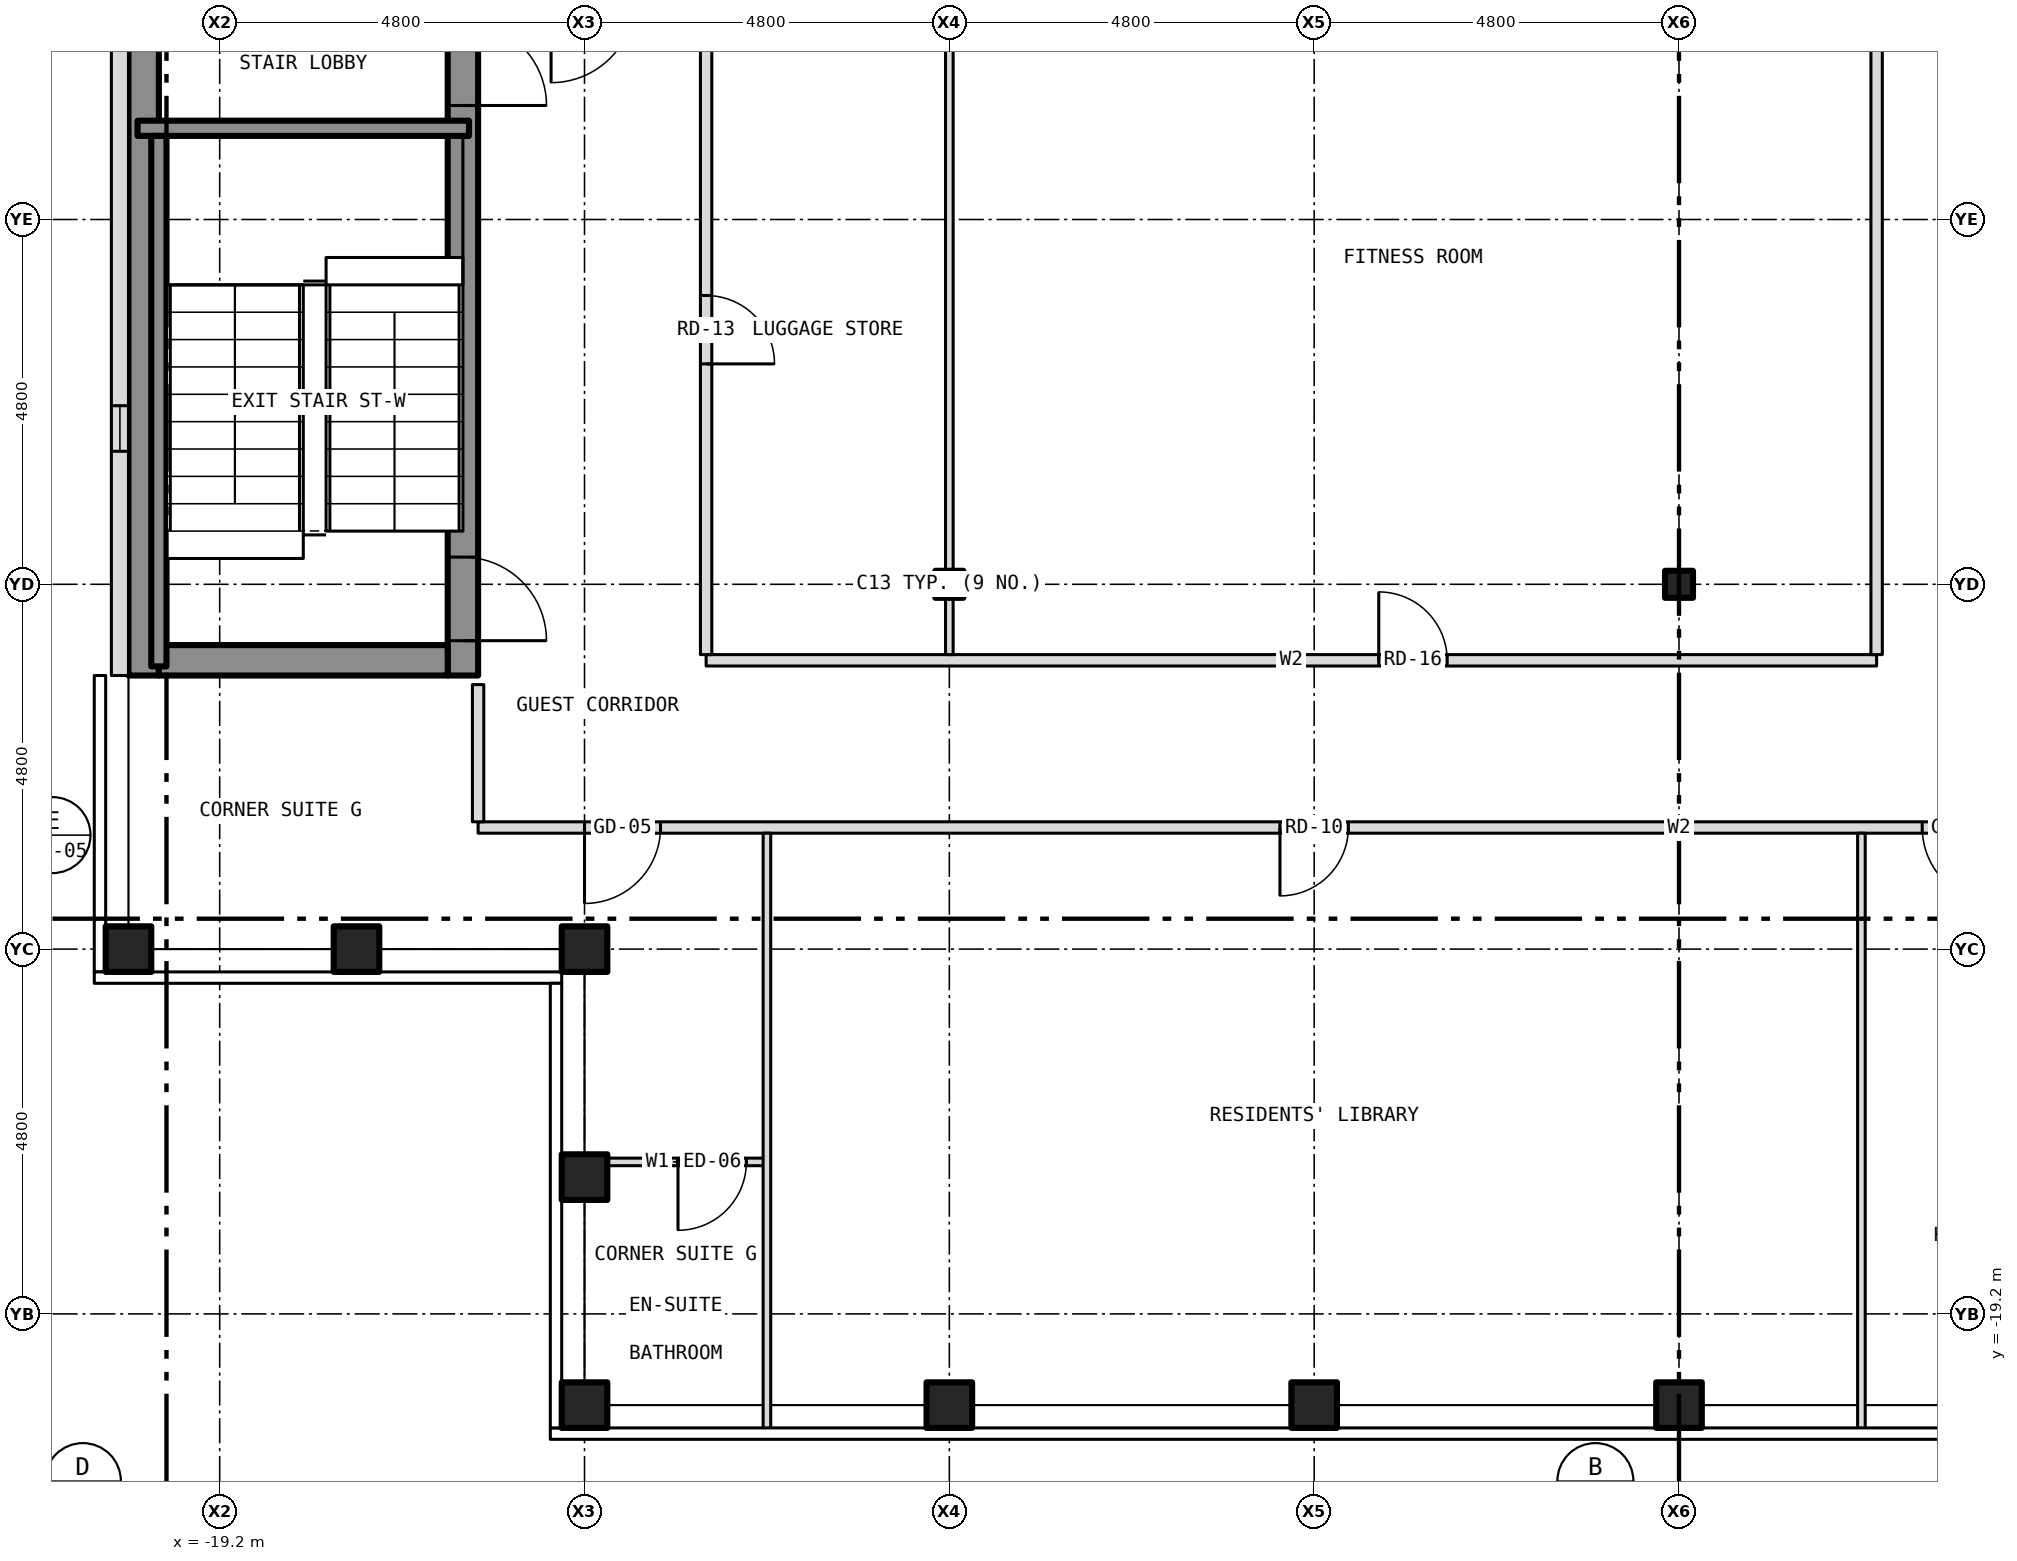
"""IFC4 building model, lengths in metres.
Left out: names, types, materials, properties, quantities, classifications, styles, units other than length and angle.
Written with IfcOpenShell. Run it as: python <this file> out.ifc"""

import sys

from ifc_helpers import new_model, si_unit, direction, frame, frame_2d, origin, origin_2d, place, context, subcontext, project, spatial, rectangle, hollow_rectangle, i_section, extrude, element, fill, save


model = new_model("IFC4")
c1 = context("Model", 3, precision=1e-05, world=origin(), true_north=direction((0.0, 1.0)))
c2 = subcontext(c1, "Body", "Model", "MODEL_VIEW")
j1 = project(units=[si_unit("LENGTHUNIT", "METRE"), si_unit("PLANEANGLEUNIT", "RADIAN")], contexts=[c1])
p1 = place(None, origin())
s1 = spatial("IfcSite", under=j1, at=p1, CompositionType="ELEMENT")
p2 = place(p1, origin())
s2 = spatial("IfcBuilding", under=s1, at=p2, CompositionType="ELEMENT")
p3 = place(p2, frame((0.0, 0.0, 255.0)))
s3 = spatial("IfcBuildingStorey", under=s2, at=p3, CompositionType="ELEMENT", Elevation=255.0)
for number, where, z_axis, x_axis in (
    (1, (-14.4, -20.4, -0.15), (0.0, 0.0, 1.0), (1.0, 0.0, 0.0)),
    (2, (-9.6, -20.4, -0.15), (0.0, 0.0, 1.0), (1.0, 0.0, 0.0)),
    (3, (-4.8, -20.4, -0.15), (0.0, 0.0, 1.0), (1.0, 0.0, 0.0)),
    (4, (0.0, -20.4, -0.15), (0.0, 0.0, 1.0), (1.0, 0.0, 0.0)),
    (5, (-20.4, -14.4, -0.15), (0.0, 0.0, 1.0), (1.0, 0.0, 0.0)),
    (6, (-14.4, -14.4, -0.15), (0.0, 0.0, 1.0), (1.0, 0.0, 0.0)),
    (7, (-14.4, -17.4, -0.15), (0.0, 0.0, 1.0), (1.0, 0.0, 0.0)),
    (8, (-17.4, -14.4, -0.15), (0.0, 0.0, 1.0), (1.0, 0.0, 0.0)),
):
    element("IfcColumn", number, at=place(p3, frame(where, z_axis=z_axis, x_axis=x_axis)), inside=s3, PredefinedType="COLUMN", context=c2, shape_type="SweptSolid", body=[
        extrude(hollow_rectangle(XDim=0.6, YDim=0.6, WallThickness=0.03, at=origin_2d()), origin(), (0.0, 0.0, 1.0), 3.5),
    ])
for number, where, z_axis, x_axis in (
    (9, (-9.6, -9.6, -0.15), (0.0, 0.0, 1.0), (1.0, 0.0, 0.0)),
    (10, (0.0, -9.6, -0.15), (0.0, 0.0, 1.0), (1.0, 0.0, 0.0)),
):
    element("IfcColumn", number, at=place(p3, frame(where, z_axis=z_axis, x_axis=x_axis)), inside=s3, PredefinedType="COLUMN", context=c2, shape_type="SweptSolid", body=[
        extrude(i_section(OverallWidth=0.368, OverallDepth=0.356, WebThickness=0.011, FlangeThickness=0.018, at=origin_2d()), origin(), (0.0, 0.0, 1.0), 3.5),
    ])
p4 = place(p3, frame((-16.0, -10.8, 0.0), z_axis=(0.0, 0.0, 1.0), x_axis=(0.0, 1.0, 0.0)))
e11 = element("IfcWall", 11, at=p4, inside=s3, PredefinedType="SHEAR", context=c2, shape_type="SweptSolid", body=[
    extrude(rectangle(XDim=21.6, YDim=0.4, at=frame_2d((10.8, 0.0))), origin(), (0.0, 0.0, 1.0), 3.25),
])
p5 = place(p4, frame((9.4, 0.0, 0.0)))
e12 = element("IfcOpeningElement", 12, at=p5, cuts=e11, PredefinedType="OPENING", context=c2, shape_type="SweptSolid", body=[
    extrude(rectangle(XDim=1.1, YDim=2.1, at=frame_2d((0.55, 1.05))), frame((0.0, 0.212, 0.0), z_axis=(0.0, -1.0, 0.0), x_axis=(1.0, 0.0, 0.0)), (0.0, 0.0, 1.0), 0.424),
])
p6 = place(p4, frame((11.5, 0.0, 0.0)))
e13 = element("IfcOpeningElement", 13, at=p6, cuts=e11, PredefinedType="OPENING", context=c2, shape_type="SweptSolid", body=[
    extrude(rectangle(XDim=1.1, YDim=2.1, at=frame_2d((0.55, 1.05))), frame((0.0, 0.212, 0.0), z_axis=(0.0, -1.0, 0.0), x_axis=(1.0, 0.0, 0.0)), (0.0, 0.0, 1.0), 0.424),
])
p7 = place(p4, frame((13.6, 0.0, 0.0)))
e14 = element("IfcOpeningElement", 14, at=p7, cuts=e11, PredefinedType="OPENING", context=c2, shape_type="SweptSolid", body=[
    extrude(rectangle(XDim=1.1, YDim=2.1, at=frame_2d((0.55, 1.05))), frame((0.0, 0.212, 0.0), z_axis=(0.0, -1.0, 0.0), x_axis=(1.0, 0.0, 0.0)), (0.0, 0.0, 1.0), 0.424),
])
p8 = place(p4, frame((15.7, 0.0, 0.0)))
e15 = element("IfcOpeningElement", 15, at=p8, cuts=e11, PredefinedType="OPENING", context=c2, shape_type="SweptSolid", body=[
    extrude(rectangle(XDim=1.1, YDim=2.1, at=frame_2d((0.55, 1.05))), frame((0.0, 0.212, 0.0), z_axis=(0.0, -1.0, 0.0), x_axis=(1.0, 0.0, 0.0)), (0.0, 0.0, 1.0), 0.424),
])
p9 = place(p4, frame((17.8, 0.0, 0.0)))
e16 = element("IfcOpeningElement", 16, at=p9, cuts=e11, PredefinedType="OPENING", context=c2, shape_type="SweptSolid", body=[
    extrude(rectangle(XDim=1.1, YDim=2.1, at=frame_2d((0.55, 1.05))), frame((0.0, 0.212, 0.0), z_axis=(0.0, -1.0, 0.0), x_axis=(1.0, 0.0, 0.0)), (0.0, 0.0, 1.0), 0.424),
])
p10 = place(p4, frame((0.458, 0.0, 0.0)))
e17 = element("IfcOpeningElement", 17, at=p10, cuts=e11, PredefinedType="OPENING", context=c2, shape_type="SweptSolid", body=[
    extrude(rectangle(XDim=1.1, YDim=2.1, at=frame_2d((0.55, 1.05))), frame((0.0, 0.212, 0.0), z_axis=(0.0, -1.0, 0.0), x_axis=(1.0, 0.0, 0.0)), (0.0, 0.0, 1.0), 0.424),
])
p11 = place(p4, frame((7.5, 0.0, 0.0)))
e18 = element("IfcOpeningElement", 18, at=p11, cuts=e11, PredefinedType="OPENING", context=c2, shape_type="SweptSolid", body=[
    extrude(rectangle(XDim=1.1, YDim=2.1, at=frame_2d((0.55, 1.05))), frame((0.0, 0.212, 0.0), z_axis=(0.0, -1.0, 0.0), x_axis=(1.0, 0.0, 0.0)), (0.0, 0.0, 1.0), 0.424),
])
p12 = place(p4, frame((20.0, 0.0, 0.0)))
e19 = element("IfcOpeningElement", 19, at=p12, cuts=e11, PredefinedType="OPENING", context=c2, shape_type="SweptSolid", body=[
    extrude(rectangle(XDim=0.9, YDim=2.1, at=frame_2d((0.45, 1.05))), frame((0.0, 0.212, 0.0), z_axis=(0.0, -1.0, 0.0), x_axis=(1.0, 0.0, 0.0)), (0.0, 0.0, 1.0), 0.424),
])
p13 = place(p3, frame((-20.2, -10.8, 0.0), z_axis=(0.0, 0.0, 1.0), x_axis=(0.0, 1.0, 0.0)))
e20 = element("IfcWall", 20, at=p13, inside=s3, PredefinedType="SHEAR", context=c2, shape_type="SweptSolid", body=[
    extrude(rectangle(XDim=21.6, YDim=0.4, at=frame_2d((10.8, 0.0))), origin(), (0.0, 0.0, 1.0), 3.25),
])
p14 = place(p3, frame((-20.0, -10.6, 0.0), z_axis=(0.0, 0.0, 1.0), x_axis=(1.0, 0.0, 0.0)))
e21 = element("IfcWall", 21, at=p14, inside=s3, PredefinedType="SHEAR", context=c2, shape_type="SweptSolid", body=[
    extrude(rectangle(XDim=3.8, YDim=0.4, at=frame_2d((1.9, 0.0))), origin(), (0.0, 0.0, 1.0), 3.25),
])
p15 = place(p3, frame((-20.512, 10.8, 0.0), z_axis=(0.0, 0.0, 1.0), x_axis=(0.0, -1.0, 0.0)))
e22 = element("IfcWall", 22, at=p15, inside=s3, PredefinedType="SOLIDWALL", context=c2, shape_type="SweptSolid", body=[
    extrude(rectangle(XDim=21.6, YDim=0.225, at=frame_2d((10.8, 0.0))), origin(), (0.0, 0.0, 1.0), 3.5),
])
p16 = place(p15, frame((18.05, 0.0, 1.0)))
e23 = element("IfcOpeningElement", 23, at=p16, cuts=e22, PredefinedType="OPENING", context=c2, shape_type="SweptSolid", body=[
    extrude(rectangle(XDim=0.6, YDim=1.5, at=frame_2d((0.3, 0.75))), frame((0.0, 0.125, 0.0), z_axis=(0.0, -1.0, 0.0), x_axis=(1.0, 0.0, 0.0)), (0.0, 0.0, 1.0), 0.249),
])
p17 = place(p3, frame((-14.28, -17.2, 0.0), z_axis=(0.0, 0.0, 1.0), x_axis=(1.0, 0.0, 0.0)))
e24 = element("IfcWall", 24, at=p17, inside=s3, PredefinedType="PARTITIONING", context=c2, shape_type="SweptSolid", body=[
    extrude(rectangle(XDim=2.28, YDim=0.1, at=frame_2d((1.14, 0.0))), origin(), (0.0, 0.0, 1.0), 3.35),
])
p18 = place(p17, frame((1.11, 0.0, 0.0)))
e25 = element("IfcOpeningElement", 25, at=p18, cuts=e24, PredefinedType="OPENING", context=c2, shape_type="SweptSolid", body=[
    extrude(rectangle(XDim=0.9, YDim=2.1, at=frame_2d((0.45, 1.05))), frame((0.0, 0.062, 0.0), z_axis=(0.0, -1.0, 0.0), x_axis=(1.0, 0.0, 0.0)), (0.0, 0.0, 1.0), 0.124),
])
p19 = place(p3, frame((-15.8, -12.8, 0.0), z_axis=(0.0, 0.0, 1.0), x_axis=(1.0, 0.0, 0.0)))
e26 = element("IfcWall", 26, at=p19, inside=s3, PredefinedType="PARTITIONING", context=c2, shape_type="SweptSolid", body=[
    extrude(rectangle(XDim=31.6, YDim=0.15, at=frame_2d((15.8, 0.0))), origin(), (0.0, 0.0, 1.0), 3.35),
])
p20 = place(p19, frame((10.55, 0.0, 0.0)))
e27 = element("IfcOpeningElement", 27, at=p20, cuts=e26, PredefinedType="OPENING", context=c2, shape_type="SweptSolid", body=[
    extrude(rectangle(XDim=0.9, YDim=2.1, at=frame_2d((0.45, 1.05))), frame((0.0, 0.087, 0.0), z_axis=(0.0, -1.0, 0.0), x_axis=(1.0, 0.0, 0.0)), (0.0, 0.0, 1.0), 0.174),
])
p21 = place(p19, frame((19.0, 0.0, 0.0)))
e28 = element("IfcOpeningElement", 28, at=p21, cuts=e26, PredefinedType="OPENING", context=c2, shape_type="SweptSolid", body=[
    extrude(rectangle(XDim=1.0, YDim=2.1, at=frame_2d((0.5, 1.05))), frame((0.0, 0.087, 0.0), z_axis=(0.0, -1.0, 0.0), x_axis=(1.0, 0.0, 0.0)), (0.0, 0.0, 1.0), 0.174),
])
p22 = place(p19, frame((24.95, 0.0, 0.0)))
e29 = element("IfcOpeningElement", 29, at=p22, cuts=e26, PredefinedType="OPENING", context=c2, shape_type="SweptSolid", body=[
    extrude(rectangle(XDim=0.9, YDim=2.1, at=frame_2d((0.45, 1.05))), frame((0.0, 0.087, 0.0), z_axis=(0.0, -1.0, 0.0), x_axis=(1.0, 0.0, 0.0)), (0.0, 0.0, 1.0), 0.174),
])
p23 = place(p19, frame((1.4, 0.0, 0.0)))
e30 = element("IfcOpeningElement", 30, at=p23, cuts=e26, PredefinedType="OPENING", context=c2, shape_type="SweptSolid", body=[
    extrude(rectangle(XDim=1.0, YDim=2.1, at=frame_2d((0.5, 1.05))), frame((0.0, 0.087, 0.0), z_axis=(0.0, -1.0, 0.0), x_axis=(1.0, 0.0, 0.0)), (0.0, 0.0, 1.0), 0.174),
])
p24 = place(p19, frame((29.2, 0.0, 0.0)))
e31 = element("IfcOpeningElement", 31, at=p24, cuts=e26, PredefinedType="OPENING", context=c2, shape_type="SweptSolid", body=[
    extrude(rectangle(XDim=1.0, YDim=2.1, at=frame_2d((0.5, 1.05))), frame((0.0, 0.087, 0.0), z_axis=(0.0, -1.0, 0.0), x_axis=(1.0, 0.0, 0.0)), (0.0, 0.0, 1.0), 0.174),
])
p25 = place(p3, frame((-12.8, -10.6, 0.0), z_axis=(0.0, 0.0, 1.0), x_axis=(1.0, 0.0, 0.0)))
e32 = element("IfcWall", 32, at=p25, inside=s3, PredefinedType="PARTITIONING", context=c2, shape_type="SweptSolid", body=[
    extrude(rectangle(XDim=15.4, YDim=0.15, at=frame_2d((7.7, 0.0))), origin(), (0.0, 0.0, 1.0), 3.35),
])
p26 = place(p25, frame((8.85, 0.0, 0.0)))
e33 = element("IfcOpeningElement", 33, at=p26, cuts=e32, PredefinedType="OPENING", context=c2, shape_type="SweptSolid", body=[
    extrude(rectangle(XDim=0.9, YDim=2.1, at=frame_2d((0.45, 1.05))), frame((0.0, 0.087, 0.0), z_axis=(0.0, -1.0, 0.0), x_axis=(1.0, 0.0, 0.0)), (0.0, 0.0, 1.0), 0.174),
])
p27 = place(p3, frame((-20.28, -3.6, 0.0), z_axis=(0.0, 0.0, 1.0), x_axis=(1.0, 0.0, 0.0)))
e34 = element("IfcWall", 34, at=p27, inside=s3, PredefinedType="SHEAR", context=c2, shape_type="SweptSolid", body=[
    extrude(rectangle(XDim=4.36, YDim=0.2, at=frame_2d((2.18, 0.0))), origin(), (0.0, 0.0, 1.0), 3.25),
])
p28 = place(p3, frame((-20.0, -10.68, 0.0), z_axis=(0.0, 0.0, 1.0), x_axis=(0.0, 1.0, 0.0)))
e35 = element("IfcWall", 35, at=p28, inside=s3, PredefinedType="SHEAR", context=c2, shape_type="SweptSolid", body=[
    extrude(rectangle(XDim=6.98, YDim=0.2, at=frame_2d((3.49, 0.0))), origin(), (0.0, 0.0, 1.0), 3.25),
])
p29 = place(p3, frame((-15.8, -12.725, 0.0), z_axis=(0.0, 0.0, 1.0), x_axis=(0.0, 1.0, 0.0)))
e36 = element("IfcWall", 36, at=p29, inside=s3, PredefinedType="PARTITIONING", context=c2, shape_type="SweptSolid", body=[
    extrude(rectangle(XDim=1.805, YDim=0.15, at=frame_2d((0.903, 0.0))), origin(), (0.0, 0.0, 1.0), 3.35),
])
p30 = place(p3, frame((-12.8, -10.525, 0.0), z_axis=(0.0, 0.0, 1.0), x_axis=(0.0, 1.0, 0.0)))
e37 = element("IfcWall", 37, at=p30, inside=s3, PredefinedType="PARTITIONING", context=c2, shape_type="SweptSolid", body=[
    extrude(rectangle(XDim=8.525, YDim=0.15, at=frame_2d((4.262, 0.0))), origin(), (0.0, 0.0, 1.0), 3.35),
])
p31 = place(p30, frame((3.825, 0.0, 0.0)))
e38 = element("IfcOpeningElement", 38, at=p31, cuts=e37, PredefinedType="OPENING", context=c2, shape_type="SweptSolid", body=[
    extrude(rectangle(XDim=0.9, YDim=2.1, at=frame_2d((0.45, 1.05))), frame((0.0, 0.087, 0.0), z_axis=(0.0, -1.0, 0.0), x_axis=(1.0, 0.0, 0.0)), (0.0, 0.0, 1.0), 0.174),
])
p32 = place(p3, frame((-12.0, -20.73, 0.0), z_axis=(0.0, 0.0, 1.0), x_axis=(0.0, 1.0, 0.0)))
e39 = element("IfcWall", 39, at=p32, inside=s3, PredefinedType="PARTITIONING", context=c2, shape_type="SweptSolid", body=[
    extrude(rectangle(XDim=7.855, YDim=0.1, at=frame_2d((3.927, 0.0))), origin(), (0.0, 0.0, 1.0), 3.35),
])
p33 = place(p3, frame((-9.6, -10.525, 0.0), z_axis=(0.0, 0.0, 1.0), x_axis=(0.0, 1.0, 0.0)))
e40 = element("IfcWall", 40, at=p33, inside=s3, PredefinedType="PARTITIONING", context=c2, shape_type="SweptSolid", body=[
    extrude(rectangle(XDim=0.741, YDim=0.1, at=frame_2d((0.371, 0.0))), origin(), (0.0, 0.0, 1.0), 2.728),
])
p34 = place(p3, frame((-9.6, -9.784, 0.0), z_axis=(0.0, 0.0, 1.0), x_axis=(0.0, 1.0, 0.0)))
e41 = element("IfcWall", 41, at=p34, inside=s3, PredefinedType="PARTITIONING", context=c2, shape_type="SweptSolid", body=[
    extrude(rectangle(XDim=0.368, YDim=0.1, at=frame_2d((0.184, 0.0))), origin(), (0.0, 0.0, 1.0), 3.35),
])
p35 = place(p3, frame((-9.6, -9.416, 0.0), z_axis=(0.0, 0.0, 1.0), x_axis=(0.0, 1.0, 0.0)))
e42 = element("IfcWall", 42, at=p35, inside=s3, PredefinedType="PARTITIONING", context=c2, shape_type="SweptSolid", body=[
    extrude(rectangle(XDim=9.366, YDim=0.1, at=frame_2d((4.683, 0.0))), origin(), (0.0, 0.0, 1.0), 2.728),
])
p36 = place(p3, frame((2.4, -20.73, 0.0), z_axis=(0.0, 0.0, 1.0), x_axis=(0.0, 1.0, 0.0)))
e43 = element("IfcWall", 43, at=p36, inside=s3, PredefinedType="PARTITIONING", context=c2, shape_type="SweptSolid", body=[
    extrude(rectangle(XDim=7.855, YDim=0.1, at=frame_2d((3.927, 0.0))), origin(), (0.0, 0.0, 1.0), 3.35),
])
p37 = place(p3, frame((2.6, -10.525, 0.0), z_axis=(0.0, 0.0, 1.0), x_axis=(0.0, 1.0, 0.0)))
e44 = element("IfcWall", 44, at=p37, inside=s3, PredefinedType="PARTITIONING", context=c2, shape_type="SweptSolid", body=[
    extrude(rectangle(XDim=16.35, YDim=0.15, at=frame_2d((8.175, 0.0))), origin(), (0.0, 0.0, 1.0), 3.35),
])
p38 = place(p16, origin())
e45 = element("IfcWindow", 45, at=p38, inside=s3, PartitioningType="SINGLE_PANEL", PredefinedType="WINDOW", context=c2, shape_type="SweptSolid", body=[
    extrude(rectangle(XDim=0.6, YDim=1.5, at=frame_2d((0.3, 0.75))), frame((0.0, -0.022, 0.0), z_axis=(0.0, -1.0, 0.0), x_axis=(1.0, 0.0, 0.0)), (0.0, 0.0, 1.0), 0.06),
])
fill(e23, e45)
p39 = place(p10, origin())
e46 = element("IfcDoor", 46, at=p39, inside=s3, OperationType="SINGLE_SWING_LEFT", PredefinedType="DOOR", context=c2, shape_type="SweptSolid", body=[
    extrude(rectangle(XDim=1.1, YDim=2.1, at=frame_2d((0.55, 1.05))), frame((0.0, 0.025, 0.0), z_axis=(0.0, -1.0, 0.0), x_axis=(1.0, 0.0, 0.0)), (0.0, 0.0, 1.0), 0.05),
])
fill(e17, e46)
p40 = place(p11, origin())
e47 = element("IfcDoor", 47, at=p40, inside=s3, OperationType="SINGLE_SWING_LEFT", PredefinedType="DOOR", context=c2, shape_type="SweptSolid", body=[
    extrude(rectangle(XDim=1.1, YDim=2.1, at=frame_2d((0.55, 1.05))), frame((0.0, 0.025, 0.0), z_axis=(0.0, -1.0, 0.0), x_axis=(1.0, 0.0, 0.0)), (0.0, 0.0, 1.0), 0.05),
])
fill(e18, e47)
p41 = place(p20, origin())
e48 = element("IfcDoor", 48, at=p41, inside=s3, OperationType="SINGLE_SWING_LEFT", PredefinedType="DOOR", context=c2, shape_type="SweptSolid", body=[
    extrude(rectangle(XDim=0.9, YDim=2.1, at=frame_2d((0.45, 1.05))), frame((0.0, 0.025, 0.0), z_axis=(0.0, -1.0, 0.0), x_axis=(1.0, 0.0, 0.0)), (0.0, 0.0, 1.0), 0.05),
])
fill(e27, e48)
p42 = place(p21, origin())
e49 = element("IfcDoor", 49, at=p42, inside=s3, OperationType="SINGLE_SWING_RIGHT", PredefinedType="DOOR", context=c2, shape_type="SweptSolid", body=[
    extrude(rectangle(XDim=1.0, YDim=2.1, at=frame_2d((0.5, 1.05))), frame((0.0, 0.025, 0.0), z_axis=(0.0, -1.0, 0.0), x_axis=(1.0, 0.0, 0.0)), (0.0, 0.0, 1.0), 0.05),
])
fill(e28, e49)
p43 = place(p18, origin())
e50 = element("IfcDoor", 50, at=p43, inside=s3, OperationType="SINGLE_SWING_LEFT", PredefinedType="DOOR", context=c2, shape_type="SweptSolid", body=[
    extrude(rectangle(XDim=0.9, YDim=2.1, at=frame_2d((0.45, 1.05))), frame((0.0, 0.025, 0.0), z_axis=(0.0, -1.0, 0.0), x_axis=(1.0, 0.0, 0.0)), (0.0, 0.0, 1.0), 0.05),
])
fill(e25, e50)
p44 = place(p23, origin())
e51 = element("IfcDoor", 51, at=p44, inside=s3, OperationType="SINGLE_SWING_LEFT", PredefinedType="DOOR", context=c2, shape_type="SweptSolid", body=[
    extrude(rectangle(XDim=1.0, YDim=2.1, at=frame_2d((0.5, 1.05))), frame((0.0, 0.025, 0.0), z_axis=(0.0, -1.0, 0.0), x_axis=(1.0, 0.0, 0.0)), (0.0, 0.0, 1.0), 0.05),
])
fill(e30, e51)
p45 = place(p31, origin())
e52 = element("IfcDoor", 52, at=p45, inside=s3, OperationType="SINGLE_SWING_LEFT", PredefinedType="DOOR", context=c2, shape_type="SweptSolid", body=[
    extrude(rectangle(XDim=0.9, YDim=2.1, at=frame_2d((0.45, 1.05))), frame((0.0, 0.025, 0.0), z_axis=(0.0, -1.0, 0.0), x_axis=(1.0, 0.0, 0.0)), (0.0, 0.0, 1.0), 0.05),
])
fill(e38, e52)
p46 = place(p26, origin())
e53 = element("IfcDoor", 53, at=p46, inside=s3, OperationType="SINGLE_SWING_LEFT", PredefinedType="DOOR", context=c2, shape_type="SweptSolid", body=[
    extrude(rectangle(XDim=0.9, YDim=2.1, at=frame_2d((0.45, 1.05))), frame((0.0, 0.025, 0.0), z_axis=(0.0, -1.0, 0.0), x_axis=(1.0, 0.0, 0.0)), (0.0, 0.0, 1.0), 0.05),
])
fill(e33, e53)
save(model, sys.argv[1])
